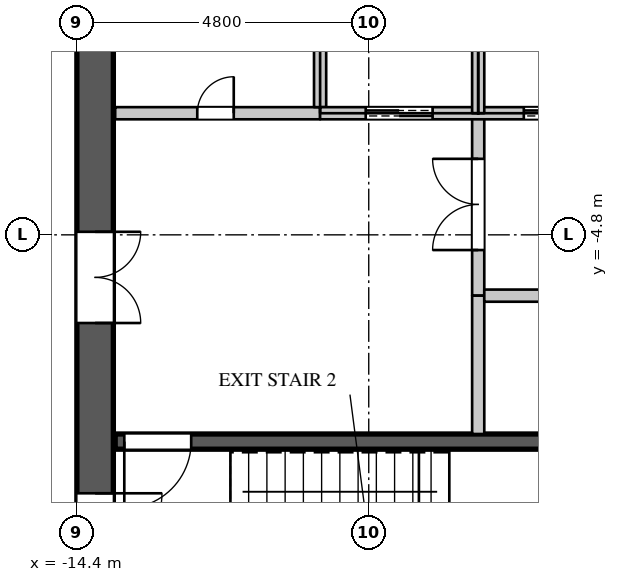
"""IFC4 building model, lengths in metres.
Left out: names, types, materials, properties, quantities, classifications, styles, units other than length and angle.
Written with IfcOpenShell. Run it as: python <this file> out.ifc"""

import sys

from ifc_helpers import new_model, si_unit, direction, frame, frame_2d, origin, place, context, subcontext, project, spatial, rectangle, extrude, element, fill, save


model = new_model("IFC4")
c1 = context("Model", 3, precision=1e-05, world=origin(), true_north=direction((0.0, 1.0)))
c2 = subcontext(c1, "Body", "Model", "MODEL_VIEW")
j1 = project(units=[si_unit("LENGTHUNIT", "METRE"), si_unit("PLANEANGLEUNIT", "RADIAN")], contexts=[c1])
p1 = place(None, origin())
s1 = spatial("IfcSite", under=j1, at=p1, CompositionType="ELEMENT")
p2 = place(p1, origin())
s2 = spatial("IfcBuilding", under=s1, at=p2, CompositionType="ELEMENT")
p3 = place(p2, frame((0.0, 0.0, 306.3)))
s3 = spatial("IfcBuildingStorey", under=s2, at=p3, CompositionType="ELEMENT", Elevation=306.3)
p4 = place(p3, frame((-14.1, -11.4, 0.0), z_axis=(0.0, 0.0, 1.0), x_axis=(0.0, 1.0, 0.0)))
e1 = element("IfcWall", 1, at=p4, inside=s3, PredefinedType="SHEAR", context=c2, shape_type="SweptSolid", body=[
    extrude(rectangle(XDim=22.8, YDim=0.6, at=frame_2d((11.4, 0.0))), origin(), (0.0, 0.0, 1.0), 4.2),
])
p5 = place(p4, frame((20.45, 0.0, 0.0)))
e2 = element("IfcOpeningElement", 2, at=p5, cuts=e1, PredefinedType="OPENING", context=c2, shape_type="SweptSolid", body=[
    extrude(rectangle(XDim=1.1, YDim=2.2, at=frame_2d((0.55, 1.1))), frame((0.0, 0.31, 0.0), z_axis=(0.0, -1.0, 0.0), x_axis=(1.0, 0.0, 0.0)), (0.0, 0.0, 1.0), 0.62),
])
p6 = place(p4, frame((1.25, 0.0, 0.0)))
e3 = element("IfcOpeningElement", 3, at=p6, cuts=e1, PredefinedType="OPENING", context=c2, shape_type="SweptSolid", body=[
    extrude(rectangle(XDim=1.1, YDim=2.2, at=frame_2d((0.55, 1.1))), frame((0.0, 0.31, 0.0), z_axis=(0.0, -1.0, 0.0), x_axis=(1.0, 0.0, 0.0)), (0.0, 0.0, 1.0), 0.62),
])
p7 = place(p4, frame((16.15, 0.0, 0.0)))
e4 = element("IfcOpeningElement", 4, at=p7, cuts=e1, PredefinedType="OPENING", context=c2, shape_type="SweptSolid", body=[
    extrude(rectangle(XDim=1.5, YDim=2.4, at=frame_2d((0.75, 1.2))), frame((0.0, 0.31, 0.0), z_axis=(0.0, -1.0, 0.0), x_axis=(1.0, 0.0, 0.0)), (0.0, 0.0, 1.0), 0.62),
])
p8 = place(p4, frame((5.15, 0.0, 0.0)))
e5 = element("IfcOpeningElement", 5, at=p8, cuts=e1, PredefinedType="OPENING", context=c2, shape_type="SweptSolid", body=[
    extrude(rectangle(XDim=1.5, YDim=2.4, at=frame_2d((0.75, 1.2))), frame((0.0, 0.31, 0.0), z_axis=(0.0, -1.0, 0.0), x_axis=(1.0, 0.0, 0.0)), (0.0, 0.0, 1.0), 0.62),
])
p9 = place(p3, frame((-7.8, -5.8, 0.0), z_axis=(0.0, 0.0, 1.0), x_axis=(0.0, 1.0, 0.0)))
e6 = element("IfcWall", 6, at=p9, inside=s3, PredefinedType="PARTITIONING", context=c2, shape_type="SweptSolid", body=[
    extrude(rectangle(XDim=3.0, YDim=0.2, at=frame_2d((1.5, 0.0))), origin(), (0.0, 0.0, 1.0), 3.9),
])
p10 = place(p9, frame((0.75, 0.0, 0.0)))
e7 = element("IfcOpeningElement", 7, at=p10, cuts=e6, PredefinedType="OPENING", context=c2, shape_type="SweptSolid", body=[
    extrude(rectangle(XDim=1.5, YDim=2.4, at=frame_2d((0.75, 1.2))), frame((0.0, 0.11, 0.0), z_axis=(0.0, -1.0, 0.0), x_axis=(1.0, 0.0, 0.0)), (0.0, 0.0, 1.0), 0.22),
])
p11 = place(p3, frame((-13.77, -2.8, 0.0), z_axis=(0.0, 0.0, 1.0), x_axis=(1.0, 0.0, 0.0)))
e8 = element("IfcWall", 8, at=p11, inside=s3, PredefinedType="PARTITIONING", context=c2, shape_type="SweptSolid", body=[
    extrude(rectangle(XDim=3.37, YDim=0.2, at=frame_2d((1.685, 0.0))), origin(), (0.0, 0.0, 1.0), 3.9),
])
p12 = place(p11, frame((1.35, 0.0, 0.0)))
e9 = element("IfcOpeningElement", 9, at=p12, cuts=e8, PredefinedType="OPENING", context=c2, shape_type="SweptSolid", body=[
    extrude(rectangle(XDim=0.6, YDim=2.0, at=frame_2d((0.3, 1.0))), frame((0.0, 0.11, 0.0), z_axis=(0.0, -1.0, 0.0), x_axis=(1.0, 0.0, 0.0)), (0.0, 0.0, 1.0), 0.22),
])
p13 = place(p3, frame((-7.8, -8.075, 0.0), z_axis=(0.0, 0.0, 1.0), x_axis=(0.0, 1.0, 0.0)))
e10 = element("IfcWall", 10, at=p13, inside=s3, PredefinedType="PARTITIONING", context=c2, shape_type="SweptSolid", body=[
    extrude(rectangle(XDim=2.275, YDim=0.2, at=frame_2d((1.137, 0.0))), origin(), (0.0, 0.0, 1.0), 3.9),
])
p14 = place(p3, frame((-7.7, -5.8, 0.0), z_axis=(0.0, 0.0, 1.0), x_axis=(1.0, 0.0, 0.0)))
e11 = element("IfcWall", 11, at=p14, inside=s3, PredefinedType="PARTITIONING", context=c2, shape_type="SweptSolid", body=[
    extrude(rectangle(XDim=3.88, YDim=0.2, at=frame_2d((1.94, 0.0))), origin(), (0.0, 0.0, 1.0), 3.9),
])
p15 = place(p14, frame((1.5, 0.0, 0.0)))
e12 = element("IfcOpeningElement", 12, at=p15, cuts=e11, PredefinedType="OPENING", context=c2, shape_type="SweptSolid", body=[
    extrude(rectangle(XDim=0.9, YDim=2.2, at=frame_2d((0.45, 1.1))), frame((0.0, 0.11, 0.0), z_axis=(0.0, -1.0, 0.0), x_axis=(1.0, 0.0, 0.0)), (0.0, 0.0, 1.0), 0.22),
])
p16 = place(p3, frame((-10.4, -2.7, 0.0), z_axis=(0.0, 0.0, 1.0), x_axis=(0.0, 1.0, 0.0)))
e13 = element("IfcWall", 13, at=p16, inside=s3, PredefinedType="PARTITIONING", context=c2, shape_type="SweptSolid", body=[
    extrude(rectangle(XDim=2.7, YDim=0.2, at=frame_2d((1.35, 0.0))), origin(), (0.0, 0.0, 1.0), 3.9),
])
p17 = place(p3, frame((-10.4, -2.8, 0.0), z_axis=(0.0, 0.0, 1.0), x_axis=(1.0, 0.0, 0.0)))
e14 = element("IfcWall", 14, at=p17, inside=s3, PredefinedType="PARTITIONING", context=c2, shape_type="SweptSolid", body=[
    extrude(rectangle(XDim=18.2, YDim=0.2, at=frame_2d((9.1, 0.0))), origin(), (0.0, 0.0, 1.0), 3.9),
])
p18 = place(p17, frame((0.75, 0.0, 0.0)))
e15 = element("IfcOpeningElement", 15, at=p18, cuts=e14, PredefinedType="OPENING", context=c2, shape_type="SweptSolid", body=[
    extrude(rectangle(XDim=1.1, YDim=2.2, at=frame_2d((0.55, 1.1))), frame((0.0, 0.11, 0.0), z_axis=(0.0, -1.0, 0.0), x_axis=(1.0, 0.0, 0.0)), (0.0, 0.0, 1.0), 0.22),
])
p19 = place(p17, frame((3.35, 0.0, 0.0)))
e16 = element("IfcOpeningElement", 16, at=p19, cuts=e14, PredefinedType="OPENING", context=c2, shape_type="SweptSolid", body=[
    extrude(rectangle(XDim=1.1, YDim=2.2, at=frame_2d((0.55, 1.1))), frame((0.0, 0.11, 0.0), z_axis=(0.0, -1.0, 0.0), x_axis=(1.0, 0.0, 0.0)), (0.0, 0.0, 1.0), 0.22),
])
p20 = place(p17, frame((5.95, 0.0, 0.0)))
e17 = element("IfcOpeningElement", 17, at=p20, cuts=e14, PredefinedType="OPENING", context=c2, shape_type="SweptSolid", body=[
    extrude(rectangle(XDim=1.1, YDim=2.2, at=frame_2d((0.55, 1.1))), frame((0.0, 0.11, 0.0), z_axis=(0.0, -1.0, 0.0), x_axis=(1.0, 0.0, 0.0)), (0.0, 0.0, 1.0), 0.22),
])
p21 = place(p17, frame((8.55, 0.0, 0.0)))
e18 = element("IfcOpeningElement", 18, at=p21, cuts=e14, PredefinedType="OPENING", context=c2, shape_type="SweptSolid", body=[
    extrude(rectangle(XDim=1.1, YDim=2.2, at=frame_2d((0.55, 1.1))), frame((0.0, 0.11, 0.0), z_axis=(0.0, -1.0, 0.0), x_axis=(1.0, 0.0, 0.0)), (0.0, 0.0, 1.0), 0.22),
])
p22 = place(p17, frame((11.15, 0.0, 0.0)))
e19 = element("IfcOpeningElement", 19, at=p22, cuts=e14, PredefinedType="OPENING", context=c2, shape_type="SweptSolid", body=[
    extrude(rectangle(XDim=1.1, YDim=2.2, at=frame_2d((0.55, 1.1))), frame((0.0, 0.11, 0.0), z_axis=(0.0, -1.0, 0.0), x_axis=(1.0, 0.0, 0.0)), (0.0, 0.0, 1.0), 0.22),
])
p23 = place(p17, frame((13.75, 0.0, 0.0)))
e20 = element("IfcOpeningElement", 20, at=p23, cuts=e14, PredefinedType="OPENING", context=c2, shape_type="SweptSolid", body=[
    extrude(rectangle(XDim=1.1, YDim=2.2, at=frame_2d((0.55, 1.1))), frame((0.0, 0.11, 0.0), z_axis=(0.0, -1.0, 0.0), x_axis=(1.0, 0.0, 0.0)), (0.0, 0.0, 1.0), 0.22),
])
p24 = place(p17, frame((16.35, 0.0, 0.0)))
e21 = element("IfcOpeningElement", 21, at=p24, cuts=e14, PredefinedType="OPENING", context=c2, shape_type="SweptSolid", body=[
    extrude(rectangle(XDim=1.1, YDim=2.2, at=frame_2d((0.55, 1.1))), frame((0.0, 0.11, 0.0), z_axis=(0.0, -1.0, 0.0), x_axis=(1.0, 0.0, 0.0)), (0.0, 0.0, 1.0), 0.22),
])
p25 = place(p3, frame((-7.8, -2.8, 0.0), z_axis=(0.0, 0.0, 1.0), x_axis=(0.0, 1.0, 0.0)))
e22 = element("IfcWall", 22, at=p25, inside=s3, PredefinedType="PARTITIONING", context=c2, shape_type="SweptSolid", body=[
    extrude(rectangle(XDim=2.8, YDim=0.2, at=frame_2d((1.4, 0.0))), origin(), (0.0, 0.0, 1.0), 3.9),
])
p26 = place(p3, frame((-13.77, -8.2, 0.0), z_axis=(0.0, 0.0, 1.0), x_axis=(1.0, 0.0, 0.0)))
e23 = element("IfcWall", 23, at=p26, inside=s3, PredefinedType="SHEAR", context=c2, shape_type="SweptSolid", body=[
    extrude(rectangle(XDim=8.495, YDim=0.25, at=frame_2d((4.248, 0.0))), origin(), (0.0, 0.0, 1.0), 3.9),
])
p27 = place(p26, frame((0.15, 0.0, 0.0)))
e24 = element("IfcOpeningElement", 24, at=p27, cuts=e23, PredefinedType="OPENING", context=c2, shape_type="SweptSolid", body=[
    extrude(rectangle(XDim=1.1, YDim=2.2, at=frame_2d((0.55, 1.1))), frame((0.0, 0.135, 0.0), z_axis=(0.0, -1.0, 0.0), x_axis=(1.0, 0.0, 0.0)), (0.0, 0.0, 1.0), 0.27),
])
p28 = place(p12, origin())
e25 = element("IfcDoor", 25, at=p28, inside=s3, OperationType="SINGLE_SWING_RIGHT", PredefinedType="DOOR", context=c2, shape_type="SweptSolid", body=[
    extrude(rectangle(XDim=0.6, YDim=2.0, at=frame_2d((0.3, 1.0))), frame((0.0, 0.025, 0.0), z_axis=(0.0, -1.0, 0.0), x_axis=(1.0, 0.0, 0.0)), (0.0, 0.0, 1.0), 0.05),
])
fill(e9, e25)
p29 = place(p18, origin())
e26 = element("IfcDoor", 26, at=p29, inside=s3, OperationType="DOUBLE_DOOR_SLIDING", PredefinedType="DOOR", context=c2, shape_type="SweptSolid", body=[
    extrude(rectangle(XDim=1.1, YDim=2.2, at=frame_2d((0.55, 1.1))), frame((0.0, 0.025, 0.0), z_axis=(0.0, -1.0, 0.0), x_axis=(1.0, 0.0, 0.0)), (0.0, 0.0, 1.0), 0.05),
])
fill(e15, e26)
p30 = place(p19, origin())
e27 = element("IfcDoor", 27, at=p30, inside=s3, OperationType="DOUBLE_DOOR_SLIDING", PredefinedType="DOOR", context=c2, shape_type="SweptSolid", body=[
    extrude(rectangle(XDim=1.1, YDim=2.2, at=frame_2d((0.55, 1.1))), frame((0.0, 0.025, 0.0), z_axis=(0.0, -1.0, 0.0), x_axis=(1.0, 0.0, 0.0)), (0.0, 0.0, 1.0), 0.05),
])
fill(e16, e27)
p31 = place(p27, origin())
e28 = element("IfcDoor", 28, at=p31, inside=s3, OperationType="SINGLE_SWING_RIGHT", PredefinedType="DOOR", context=c2, shape_type="SweptSolid", body=[
    extrude(rectangle(XDim=1.1, YDim=2.2, at=frame_2d((0.55, 1.1))), frame((0.0, 0.025, 0.0), z_axis=(0.0, -1.0, 0.0), x_axis=(1.0, 0.0, 0.0)), (0.0, 0.0, 1.0), 0.05),
])
fill(e24, e28)
p32 = place(p10, origin())
e29 = element("IfcDoor", 29, at=p32, inside=s3, OperationType="DOUBLE_DOOR_SINGLE_SWING", PredefinedType="DOOR", context=c2, shape_type="SweptSolid", body=[
    extrude(rectangle(XDim=1.5, YDim=2.4, at=frame_2d((0.75, 1.2))), frame((0.0, 0.025, 0.0), z_axis=(0.0, -1.0, 0.0), x_axis=(1.0, 0.0, 0.0)), (0.0, 0.0, 1.0), 0.05),
])
fill(e7, e29)
p33 = place(p6, origin())
e30 = element("IfcDoor", 30, at=p33, inside=s3, OperationType="SINGLE_SWING_LEFT", PredefinedType="DOOR", context=c2, shape_type="SweptSolid", body=[
    extrude(rectangle(XDim=1.1, YDim=2.2, at=frame_2d((0.55, 1.1))), frame((0.0, -0.245, 0.0), z_axis=(0.0, -1.0, 0.0), x_axis=(1.0, 0.0, 0.0)), (0.0, 0.0, 1.0), 0.05),
])
fill(e3, e30)
p34 = place(p8, origin())
e31 = element("IfcDoor", 31, at=p34, inside=s3, OperationType="DOUBLE_DOOR_SINGLE_SWING", PredefinedType="DOOR", context=c2, shape_type="SweptSolid", body=[
    extrude(rectangle(XDim=1.5, YDim=2.4, at=frame_2d((0.75, 1.2))), frame((0.0, -0.245, 0.0), z_axis=(0.0, -1.0, 0.0), x_axis=(1.0, 0.0, 0.0)), (0.0, 0.0, 1.0), 0.05),
])
fill(e5, e31)
save(model, sys.argv[1])
